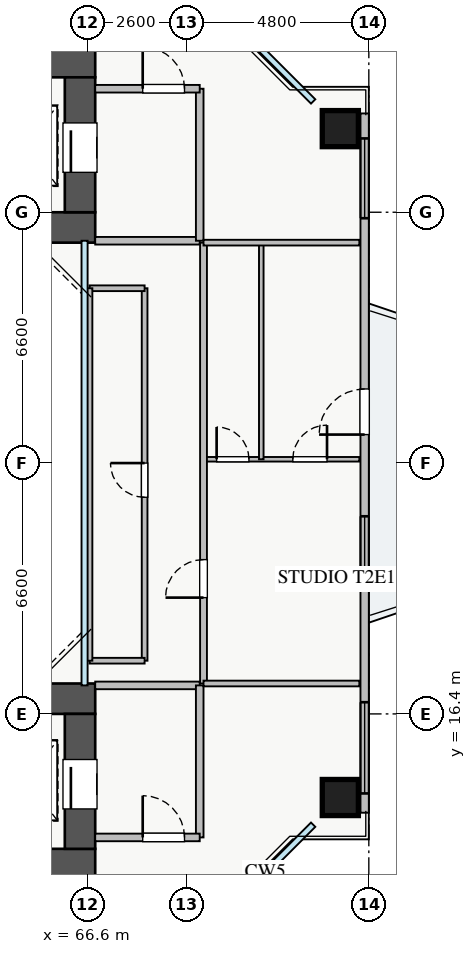
"""IFC4 building model, lengths in metres.
Left out: names, types, materials, properties, quantities, classifications, styles, units other than length and angle.
Written with IfcOpenShell. Run it as: python <this file> out.ifc"""

import sys

from ifc_helpers import new_model, si_unit, direction, frame, frame_2d, origin, origin_2d, place, context, subcontext, project, spatial, rectangle, extrude, source, transform, mapped, element, fill, save


model = new_model("IFC4")
c1 = context("Model", 3, precision=1e-05, world=origin(), true_north=direction((0.0, 1.0)))
c2 = subcontext(c1, "Body", "Model", "MODEL_VIEW")
j1 = project(units=[si_unit("LENGTHUNIT", "METRE"), si_unit("PLANEANGLEUNIT", "RADIAN")], contexts=[c1])
p1 = place(None, origin())
s1 = spatial("IfcSite", under=j1, at=p1, CompositionType="ELEMENT")
p2 = place(p1, origin())
s2 = spatial("IfcBuilding", under=s1, at=p2, CompositionType="ELEMENT")
p3 = place(p2, frame((0.0, 0.0, 63.25)))
s3 = spatial("IfcBuildingStorey", under=s2, at=p3, CompositionType="ELEMENT", Elevation=63.25)
p4 = place(p3, frame((54.2, 29.2, 0.0), z_axis=(0.0, 0.0, 1.0), x_axis=(1.0, 0.0, 0.0)))
e1 = element("IfcWall", 1, at=p4, inside=s3, PredefinedType="SHEAR", context=c2, shape_type="SweptSolid", body=[
    extrude(rectangle(XDim=12.6, YDim=0.8, at=frame_2d((6.3, 0.0))), origin(), (0.0, 0.0, 1.0), 3.25),
])
p5 = place(p3, frame((54.2, 33.55, 0.0), z_axis=(0.0, 0.0, 1.0), x_axis=(1.0, 0.0, 0.0)))
e2 = element("IfcWall", 2, at=p5, inside=s3, PredefinedType="SHEAR", context=c2, shape_type="SweptSolid", body=[
    extrude(rectangle(XDim=12.6, YDim=0.8, at=frame_2d((6.3, 0.0))), origin(), (0.0, 0.0, 1.0), 3.25),
])
p6 = place(p5, frame((8.2, 0.0, 0.0)))
e3 = element("IfcOpeningElement", 3, at=p6, cuts=e2, PredefinedType="OPENING", context=c2, shape_type="SweptSolid", body=[
    extrude(rectangle(XDim=1.1, YDim=2.05, at=frame_2d((0.55, 1.025))), frame((0.0, 0.41, 0.0), z_axis=(0.0, -1.0, 0.0), x_axis=(1.0, 0.0, 0.0)), (0.0, 0.0, 1.0), 0.82),
])
p7 = place(p3, frame((66.4, 29.6, 0.0), z_axis=(0.0, 0.0, 1.0), x_axis=(0.0, 1.0, 0.0)))
e4 = element("IfcWall", 4, at=p7, inside=s3, PredefinedType="SHEAR", context=c2, shape_type="SweptSolid", body=[
    extrude(rectangle(XDim=3.55, YDim=0.8, at=frame_2d((1.775, 0.0))), origin(), (0.0, 0.0, 1.0), 3.25),
])
p8 = place(p7, frame((1.05, 0.0, 0.0)))
e5 = element("IfcOpeningElement", 5, at=p8, cuts=e4, PredefinedType="OPENING", context=c2, shape_type="SweptSolid", body=[
    extrude(rectangle(XDim=1.3, YDim=2.05, at=frame_2d((0.65, 1.025))), frame((0.0, 0.41, 0.0), z_axis=(0.0, -1.0, 0.0), x_axis=(1.0, 0.0, 0.0)), (0.0, 0.0, 1.0), 0.82),
])
p9 = place(p3, frame((54.2, 12.45, 0.0), z_axis=(0.0, 0.0, 1.0), x_axis=(1.0, 0.0, 0.0)))
e6 = element("IfcWall", 6, at=p9, inside=s3, PredefinedType="SHEAR", context=c2, shape_type="SweptSolid", body=[
    extrude(rectangle(XDim=12.6, YDim=0.8, at=frame_2d((6.3, 0.0))), origin(), (0.0, 0.0, 1.0), 3.25),
])
p10 = place(p9, frame((8.2, 0.0, 0.0)))
e7 = element("IfcOpeningElement", 7, at=p10, cuts=e6, PredefinedType="OPENING", context=c2, shape_type="SweptSolid", body=[
    extrude(rectangle(XDim=1.1, YDim=2.05, at=frame_2d((0.55, 1.025))), frame((0.0, 0.41, 0.0), z_axis=(0.0, -1.0, 0.0), x_axis=(1.0, 0.0, 0.0)), (0.0, 0.0, 1.0), 0.82),
])
p11 = place(p3, frame((54.2, 16.8, 0.0), z_axis=(0.0, 0.0, 1.0), x_axis=(1.0, 0.0, 0.0)))
e8 = element("IfcWall", 8, at=p11, inside=s3, PredefinedType="SHEAR", context=c2, shape_type="SweptSolid", body=[
    extrude(rectangle(XDim=12.6, YDim=0.8, at=frame_2d((6.3, 0.0))), origin(), (0.0, 0.0, 1.0), 3.25),
])
p12 = place(p3, frame((66.4, 12.85, 0.0), z_axis=(0.0, 0.0, 1.0), x_axis=(0.0, 1.0, 0.0)))
e9 = element("IfcWall", 9, at=p12, inside=s3, PredefinedType="SHEAR", context=c2, shape_type="SweptSolid", body=[
    extrude(rectangle(XDim=3.55, YDim=0.8, at=frame_2d((1.775, 0.0))), origin(), (0.0, 0.0, 1.0), 3.25),
])
p13 = place(p12, frame((1.05, 0.0, 0.0)))
e10 = element("IfcOpeningElement", 10, at=p13, cuts=e9, PredefinedType="OPENING", context=c2, shape_type="SweptSolid", body=[
    extrude(rectangle(XDim=1.3, YDim=2.05, at=frame_2d((0.65, 1.025))), frame((0.0, 0.41, 0.0), z_axis=(0.0, -1.0, 0.0), x_axis=(1.0, 0.0, 0.0)), (0.0, 0.0, 1.0), 0.82),
])
m1 = source(origin(), c2, "Body", "SweptSolid", [
    extrude(rectangle(XDim=0.95, YDim=0.95, at=origin_2d()), origin(), (0.0, 0.0, 1.0), 3.25),
])
for number, where, z_axis, x_axis in (
    (11, (73.25, 14.2, 0.0), (0.0, 0.0, 1.0), (1.0, 0.0, 0.0)),
    (12, (73.25, 31.8, 0.0), (0.0, 0.0, 1.0), (1.0, 0.0, 0.0)),
):
    element("IfcColumn", number, at=place(p3, frame(where, z_axis=z_axis, x_axis=x_axis)), inside=s3, PredefinedType="COLUMN", context=c2, shape_type="MappedRepresentation", body=[
        mapped(m1, transform((0.0, 0.0, 0.0), x_axis=(1.0, 0.0, 0.0), y_axis=(0.0, 1.0, 0.0), z_axis=(0.0, 0.0, 1.0), scale=1.0)),
    ])
p14 = place(p3, frame((73.89, 13.8, 0.0), z_axis=(0.0, 0.0, 1.0), x_axis=(0.0, 1.0, 0.0)))
e13 = element("IfcWall", 13, at=p14, inside=s3, PredefinedType="STANDARD", context=c2, shape_type="SweptSolid", body=[
    extrude(rectangle(XDim=18.4, YDim=0.22, at=frame_2d((9.2, 0.0))), origin(), (0.0, 0.0, 1.0), 2.61),
])
p15 = place(p14, frame((9.95, 0.0, 0.0)))
e14 = element("IfcOpeningElement", 14, at=p15, cuts=e13, PredefinedType="OPENING", context=c2, shape_type="SweptSolid", body=[
    extrude(rectangle(XDim=1.2, YDim=2.1, at=frame_2d((0.6, 1.05))), frame((0.0, 0.12, 0.0), z_axis=(0.0, -1.0, 0.0), x_axis=(1.0, 0.0, 0.0)), (0.0, 0.0, 1.0), 0.24),
])
p16 = place(p14, frame((0.508, 0.0, 0.9)))
e15 = element("IfcOpeningElement", 15, at=p16, cuts=e13, PredefinedType="OPENING", context=c2, shape_type="SweptSolid", body=[
    extrude(rectangle(XDim=2.4, YDim=1.5, at=frame_2d((1.2, 0.75))), frame((0.0, 0.12, 0.0), z_axis=(0.0, -1.0, 0.0), x_axis=(1.0, 0.0, 0.0)), (0.0, 0.0, 1.0), 0.24),
])
p17 = place(p14, frame((6.0, 0.0, 0.9)))
e16 = element("IfcOpeningElement", 16, at=p17, cuts=e13, PredefinedType="OPENING", context=c2, shape_type="SweptSolid", body=[
    extrude(rectangle(XDim=1.8, YDim=1.45, at=frame_2d((0.9, 0.725))), frame((0.0, 0.12, 0.0), z_axis=(0.0, -1.0, 0.0), x_axis=(1.0, 0.0, 0.0)), (0.0, 0.0, 1.0), 0.24),
])
p18 = place(p14, frame((15.643, 0.0, 0.9)))
e17 = element("IfcOpeningElement", 17, at=p18, cuts=e13, PredefinedType="OPENING", context=c2, shape_type="SweptSolid", body=[
    extrude(rectangle(XDim=2.1, YDim=1.5, at=frame_2d((1.05, 0.75))), frame((0.0, 0.12, 0.0), z_axis=(0.0, -1.0, 0.0), x_axis=(1.0, 0.0, 0.0)), (0.0, 0.0, 1.0), 0.24),
])
p19 = place(p3, frame((66.8, 28.85, 0.0), z_axis=(0.0, 0.0, 1.0), x_axis=(1.0, 0.0, 0.0)))
e18 = element("IfcWall", 18, at=p19, inside=s3, PredefinedType="PARTITIONING", context=c2, shape_type="SweptSolid", body=[
    extrude(rectangle(XDim=2.75, YDim=0.2, at=frame_2d((1.375, 0.0))), origin(), (0.0, 0.0, 1.0), 3.07),
])
p20 = place(p3, frame((69.55, 28.85, 0.0), z_axis=(0.0, 0.0, 1.0), x_axis=(0.0, 1.0, 0.0)))
e19 = element("IfcWall", 19, at=p20, inside=s3, PredefinedType="PARTITIONING", context=c2, shape_type="SweptSolid", body=[
    extrude(rectangle(XDim=4.0, YDim=0.2, at=frame_2d((2.0, 0.0))), origin(), (0.0, 0.0, 1.0), 2.615),
])
p21 = place(p3, frame((66.8, 32.85, 0.0), z_axis=(0.0, 0.0, 1.0), x_axis=(1.0, 0.0, 0.0)))
e20 = element("IfcWall", 20, at=p21, inside=s3, PredefinedType="PARTITIONING", context=c2, shape_type="SweptSolid", body=[
    extrude(rectangle(XDim=2.75, YDim=0.2, at=frame_2d((1.375, 0.0))), origin(), (0.0, 0.0, 1.0), 3.07),
])
p22 = place(p21, frame((1.25, 0.0, 0.0)))
e21 = element("IfcOpeningElement", 21, at=p22, cuts=e20, PredefinedType="OPENING", context=c2, shape_type="SweptSolid", body=[
    extrude(rectangle(XDim=1.1, YDim=2.05, at=frame_2d((0.55, 1.025))), frame((0.0, 0.11, 0.0), z_axis=(0.0, -1.0, 0.0), x_axis=(1.0, 0.0, 0.0)), (0.0, 0.0, 1.0), 0.22),
])
p23 = place(p3, frame((66.8, 17.15, 0.0), z_axis=(0.0, 0.0, 1.0), x_axis=(1.0, 0.0, 0.0)))
e22 = element("IfcWall", 22, at=p23, inside=s3, PredefinedType="PARTITIONING", context=c2, shape_type="SweptSolid", body=[
    extrude(rectangle(XDim=2.75, YDim=0.2, at=frame_2d((1.375, 0.0))), origin(), (0.0, 0.0, 1.0), 3.07),
])
p24 = place(p3, frame((69.55, 13.15, 0.0), z_axis=(0.0, 0.0, 1.0), x_axis=(0.0, 1.0, 0.0)))
e23 = element("IfcWall", 23, at=p24, inside=s3, PredefinedType="PARTITIONING", context=c2, shape_type="SweptSolid", body=[
    extrude(rectangle(XDim=4.0, YDim=0.2, at=frame_2d((2.0, 0.0))), origin(), (0.0, 0.0, 1.0), 2.615),
])
p25 = place(p3, frame((66.8, 13.15, 0.0), z_axis=(0.0, 0.0, 1.0), x_axis=(1.0, 0.0, 0.0)))
e24 = element("IfcWall", 24, at=p25, inside=s3, PredefinedType="PARTITIONING", context=c2, shape_type="SweptSolid", body=[
    extrude(rectangle(XDim=2.75, YDim=0.2, at=frame_2d((1.375, 0.0))), origin(), (0.0, 0.0, 1.0), 3.07),
])
p26 = place(p25, frame((1.25, 0.0, 0.0)))
e25 = element("IfcOpeningElement", 25, at=p26, cuts=e24, PredefinedType="OPENING", context=c2, shape_type="SweptSolid", body=[
    extrude(rectangle(XDim=1.1, YDim=2.05, at=frame_2d((0.55, 1.025))), frame((0.0, 0.11, 0.0), z_axis=(0.0, -1.0, 0.0), x_axis=(1.0, 0.0, 0.0)), (0.0, 0.0, 1.0), 0.22),
])
p27 = place(p3, frame((69.65, 23.1, 0.0), z_axis=(0.0, 0.0, 1.0), x_axis=(1.0, 0.0, 0.0)))
e26 = element("IfcWall", 26, at=p27, inside=s3, PredefinedType="PLUMBINGWALL", context=c2, shape_type="SweptSolid", body=[
    extrude(rectangle(XDim=4.1, YDim=0.12, at=frame_2d((2.05, 0.0))), origin(), (0.0, 0.0, 1.0), 2.771),
])
p28 = place(p27, frame((0.345, 0.0, 0.0)))
e27 = element("IfcOpeningElement", 27, at=p28, cuts=e26, PredefinedType="OPENING", context=c2, shape_type="SweptSolid", body=[
    extrude(rectangle(XDim=0.85, YDim=2.05, at=frame_2d((0.425, 1.025))), frame((0.0, 0.07, 0.0), z_axis=(0.0, -1.0, 0.0), x_axis=(1.0, 0.0, 0.0)), (0.0, 0.0, 1.0), 0.14),
])
p29 = place(p27, frame((2.35, 0.0, 0.0)))
e28 = element("IfcOpeningElement", 28, at=p29, cuts=e26, PredefinedType="OPENING", context=c2, shape_type="SweptSolid", body=[
    extrude(rectangle(XDim=0.9, YDim=2.05, at=frame_2d((0.45, 1.025))), frame((0.0, 0.07, 0.0), z_axis=(0.0, -1.0, 0.0), x_axis=(1.0, 0.0, 0.0)), (0.0, 0.0, 1.0), 0.14),
])
p30 = place(p3, frame((71.17, 23.1, 0.0), z_axis=(0.0, 0.0, 1.0), x_axis=(0.0, 1.0, 0.0)))
e29 = element("IfcWall", 29, at=p30, inside=s3, PredefinedType="PLUMBINGWALL", context=c2, shape_type="SweptSolid", body=[
    extrude(rectangle(XDim=5.7, YDim=0.12, at=frame_2d((2.85, 0.0))), origin(), (0.0, 0.0, 1.0), 3.07),
])
p31 = place(p3, frame((69.65, 17.2, 0.0), z_axis=(0.0, 0.0, 1.0), x_axis=(0.0, 1.0, 0.0)))
e30 = element("IfcWall", 30, at=p31, inside=s3, PredefinedType="PARTITIONING", context=c2, shape_type="SweptSolid", body=[
    extrude(rectangle(XDim=11.6, YDim=0.18, at=frame_2d((5.8, 0.0))), origin(), (0.0, 0.0, 1.0), 3.07),
])
p32 = place(p31, frame((2.26, 0.0, 0.0)))
e31 = element("IfcOpeningElement", 31, at=p32, cuts=e30, PredefinedType="OPENING", context=c2, shape_type="SweptSolid", body=[
    extrude(rectangle(XDim=1.0, YDim=2.05, at=frame_2d((0.5, 1.025))), frame((0.0, 0.1, 0.0), z_axis=(0.0, -1.0, 0.0), x_axis=(1.0, 0.0, 0.0)), (0.0, 0.0, 1.0), 0.2),
])
for number, where, z_axis, x_axis in (
    (32, (69.65, 17.2, 0.0), (0.0, 0.0, 1.0), (1.0, 0.0, 0.0)),
    (33, (69.65, 28.8, 0.0), (0.0, 0.0, 1.0), (1.0, 0.0, 0.0)),
):
    element("IfcWall", number, at=place(p3, frame(where, z_axis=z_axis, x_axis=x_axis)), inside=s3, PredefinedType="PARTITIONING", context=c2, shape_type="SweptSolid", body=[
        extrude(rectangle(XDim=4.1, YDim=0.15, at=frame_2d((2.05, 0.0))), origin(), (0.0, 0.0, 1.0), 3.07),
    ])
p33 = place(p3, frame((68.1, 17.8, 0.0), z_axis=(0.0, 0.0, 1.0), x_axis=(0.0, 1.0, 0.0)))
e34 = element("IfcWall", 34, at=p33, inside=s3, PredefinedType="PARTITIONING", context=c2, shape_type="SweptSolid", body=[
    extrude(rectangle(XDim=9.8, YDim=0.15, at=frame_2d((4.9, 0.0))), origin(), (0.0, 0.0, 1.0), 3.07),
])
p34 = place(p33, frame((4.3, 0.0, 0.0)))
e35 = element("IfcOpeningElement", 35, at=p34, cuts=e34, PredefinedType="OPENING", context=c2, shape_type="SweptSolid", body=[
    extrude(rectangle(XDim=0.9, YDim=2.05, at=frame_2d((0.45, 1.025))), frame((0.0, 0.085, 0.0), z_axis=(0.0, -1.0, 0.0), x_axis=(1.0, 0.0, 0.0)), (0.0, 0.0, 1.0), 0.17),
])
p35 = place(p3, frame((66.65, 27.6, 0.0), z_axis=(0.0, 0.0, 1.0), x_axis=(1.0, 0.0, 0.0)))
e36 = element("IfcWall", 36, at=p35, inside=s3, PredefinedType="PARTITIONING", context=c2, shape_type="SweptSolid", body=[
    extrude(rectangle(XDim=1.45, YDim=0.15, at=frame_2d((0.725, 0.0))), origin(), (0.0, 0.0, 1.0), 2.771),
])
p36 = place(p3, frame((66.65, 17.8, 0.0), z_axis=(0.0, 0.0, 1.0), x_axis=(1.0, 0.0, 0.0)))
e37 = element("IfcWall", 37, at=p36, inside=s3, PredefinedType="PARTITIONING", context=c2, shape_type="SweptSolid", body=[
    extrude(rectangle(XDim=1.45, YDim=0.15, at=frame_2d((0.725, 0.0))), origin(), (0.0, 0.0, 1.0), 3.07),
])
p37 = place(p3, frame((66.65, 17.8, 0.0), z_axis=(0.0, 0.0, 1.0), x_axis=(0.0, 1.0, 0.0)))
e38 = element("IfcWall", 38, at=p37, inside=s3, PredefinedType="PARTITIONING", context=c2, shape_type="SweptSolid", body=[
    extrude(rectangle(XDim=9.8, YDim=0.15, at=frame_2d((4.9, 0.0))), origin(), (0.0, 0.0, 1.0), 2.665),
])
m2 = source(origin(), c2, "Body", "SweptSolid", [
    extrude(rectangle(XDim=1.2, YDim=2.1, at=frame_2d((0.6, 1.05))), frame((0.0, 0.025, 0.0), z_axis=(0.0, -1.0, 0.0), x_axis=(1.0, 0.0, 0.0)), (0.0, 0.0, 1.0), 0.05),
])
p38 = place(p15, origin())
e39 = element("IfcDoor", 39, at=p38, inside=s3, OperationType="SINGLE_SWING_LEFT", PredefinedType="DOOR", context=c2, shape_type="MappedRepresentation", body=[
    mapped(m2, transform((0.0, 0.0, 0.0), x_axis=(1.0, 0.0, 0.0), y_axis=(0.0, 1.0, 0.0), z_axis=(0.0, 0.0, 1.0), scale=1.0)),
])
fill(e14, e39)
m3 = source(origin(), c2, "Body", "SweptSolid", [
    extrude(rectangle(XDim=2.4, YDim=1.5, at=frame_2d((1.2, 0.75))), frame((0.0, 0.03, 0.0), z_axis=(0.0, -1.0, 0.0), x_axis=(1.0, 0.0, 0.0)), (0.0, 0.0, 1.0), 0.06),
])
p39 = place(p16, origin())
e40 = element("IfcWindow", 40, at=p39, inside=s3, PartitioningType="TRIPLE_PANEL_VERTICAL", PredefinedType="WINDOW", context=c2, shape_type="MappedRepresentation", body=[
    mapped(m3, transform((0.0, 0.0, 0.0), x_axis=(1.0, 0.0, 0.0), y_axis=(0.0, 1.0, 0.0), z_axis=(0.0, 0.0, 1.0), scale=1.0)),
])
fill(e15, e40)
m4 = source(origin(), c2, "Body", "SweptSolid", [
    extrude(rectangle(XDim=1.8, YDim=1.45, at=frame_2d((0.9, 0.725))), frame((0.0, 0.03, 0.0), z_axis=(0.0, -1.0, 0.0), x_axis=(1.0, 0.0, 0.0)), (0.0, 0.0, 1.0), 0.06),
])
p40 = place(p17, origin())
e41 = element("IfcWindow", 41, at=p40, inside=s3, PartitioningType="DOUBLE_PANEL_VERTICAL", PredefinedType="WINDOW", context=c2, shape_type="MappedRepresentation", body=[
    mapped(m4, transform((0.0, 0.0, 0.0), x_axis=(1.0, 0.0, 0.0), y_axis=(0.0, 1.0, 0.0), z_axis=(0.0, 0.0, 1.0), scale=1.0)),
])
fill(e16, e41)
m5 = source(origin(), c2, "Body", "SweptSolid", [
    extrude(rectangle(XDim=2.1, YDim=1.5, at=frame_2d((1.05, 0.75))), frame((0.0, 0.03, 0.0), z_axis=(0.0, -1.0, 0.0), x_axis=(1.0, 0.0, 0.0)), (0.0, 0.0, 1.0), 0.06),
])
p41 = place(p18, origin())
e42 = element("IfcWindow", 42, at=p41, inside=s3, PartitioningType="TRIPLE_PANEL_VERTICAL", PredefinedType="WINDOW", context=c2, shape_type="MappedRepresentation", body=[
    mapped(m5, transform((0.0, 0.0, 0.0), x_axis=(1.0, 0.0, 0.0), y_axis=(0.0, 1.0, 0.0), z_axis=(0.0, 0.0, 1.0), scale=1.0)),
])
fill(e17, e42)
m6 = source(origin(), c2, "Body", "SweptSolid", [
    extrude(rectangle(XDim=1.3, YDim=2.05, at=frame_2d((0.65, 1.025))), frame((0.0, 0.025, 0.0), z_axis=(0.0, -1.0, 0.0), x_axis=(1.0, 0.0, 0.0)), (0.0, 0.0, 1.0), 0.05),
])
p42 = place(p8, origin())
e43 = element("IfcDoor", 43, at=p42, inside=s3, OperationType="SLIDING_TO_LEFT", PredefinedType="DOOR", context=c2, shape_type="MappedRepresentation", body=[
    mapped(m6, transform((0.0, 0.0, 0.0), x_axis=(1.0, 0.0, 0.0), y_axis=(0.0, 1.0, 0.0), z_axis=(0.0, 0.0, 1.0), scale=1.0)),
])
fill(e5, e43)
p43 = place(p13, origin())
e44 = element("IfcDoor", 44, at=p43, inside=s3, OperationType="SLIDING_TO_RIGHT", PredefinedType="DOOR", context=c2, shape_type="MappedRepresentation", body=[
    mapped(m6, transform((0.0, 0.0, 0.0), x_axis=(1.0, 0.0, 0.0), y_axis=(0.0, 1.0, 0.0), z_axis=(0.0, 0.0, 1.0), scale=1.0)),
])
fill(e10, e44)
m7 = source(origin(), c2, "Body", "SweptSolid", [
    extrude(rectangle(XDim=1.1, YDim=2.05, at=frame_2d((0.55, 1.025))), frame((0.0, 0.025, 0.0), z_axis=(0.0, -1.0, 0.0), x_axis=(1.0, 0.0, 0.0)), (0.0, 0.0, 1.0), 0.05),
])
p44 = place(p22, origin())
e45 = element("IfcDoor", 45, at=p44, inside=s3, OperationType="SINGLE_SWING_LEFT", PredefinedType="DOOR", context=c2, shape_type="MappedRepresentation", body=[
    mapped(m7, transform((0.0, 0.0, 0.0), x_axis=(1.0, 0.0, 0.0), y_axis=(0.0, 1.0, 0.0), z_axis=(0.0, 0.0, 1.0), scale=1.0)),
])
fill(e21, e45)
p45 = place(p26, origin())
e46 = element("IfcDoor", 46, at=p45, inside=s3, OperationType="SINGLE_SWING_LEFT", PredefinedType="DOOR", context=c2, shape_type="MappedRepresentation", body=[
    mapped(m7, transform((0.0, 0.0, 0.0), x_axis=(1.0, 0.0, 0.0), y_axis=(0.0, 1.0, 0.0), z_axis=(0.0, 0.0, 1.0), scale=1.0)),
])
fill(e25, e46)
m8 = source(origin(), c2, "Body", "SweptSolid", [
    extrude(rectangle(XDim=0.85, YDim=2.05, at=frame_2d((0.425, 1.025))), frame((0.0, 0.025, 0.0), z_axis=(0.0, -1.0, 0.0), x_axis=(1.0, 0.0, 0.0)), (0.0, 0.0, 1.0), 0.05),
])
p46 = place(p28, origin())
e47 = element("IfcDoor", 47, at=p46, inside=s3, OperationType="SINGLE_SWING_LEFT", PredefinedType="DOOR", context=c2, shape_type="MappedRepresentation", body=[
    mapped(m8, transform((0.0, 0.0, 0.0), x_axis=(1.0, 0.0, 0.0), y_axis=(0.0, 1.0, 0.0), z_axis=(0.0, 0.0, 1.0), scale=1.0)),
])
fill(e27, e47)
m9 = source(origin(), c2, "Body", "SweptSolid", [
    extrude(rectangle(XDim=0.9, YDim=2.05, at=frame_2d((0.45, 1.025))), frame((0.0, 0.025, 0.0), z_axis=(0.0, -1.0, 0.0), x_axis=(1.0, 0.0, 0.0)), (0.0, 0.0, 1.0), 0.05),
])
p47 = place(p29, origin())
e48 = element("IfcDoor", 48, at=p47, inside=s3, OperationType="SINGLE_SWING_RIGHT", PredefinedType="DOOR", context=c2, shape_type="MappedRepresentation", body=[
    mapped(m9, transform((0.0, 0.0, 0.0), x_axis=(1.0, 0.0, 0.0), y_axis=(0.0, 1.0, 0.0), z_axis=(0.0, 0.0, 1.0), scale=1.0)),
])
fill(e28, e48)
m10 = source(origin(), c2, "Body", "SweptSolid", [
    extrude(rectangle(XDim=1.0, YDim=2.05, at=frame_2d((0.5, 1.025))), frame((0.0, 0.025, 0.0), z_axis=(0.0, -1.0, 0.0), x_axis=(1.0, 0.0, 0.0)), (0.0, 0.0, 1.0), 0.05),
])
p48 = place(p32, origin())
e49 = element("IfcDoor", 49, at=p48, inside=s3, OperationType="SINGLE_SWING_LEFT", PredefinedType="DOOR", context=c2, shape_type="MappedRepresentation", body=[
    mapped(m10, transform((0.0, 0.0, 0.0), x_axis=(1.0, 0.0, 0.0), y_axis=(0.0, 1.0, 0.0), z_axis=(0.0, 0.0, 1.0), scale=1.0)),
])
fill(e31, e49)
p49 = place(p34, origin())
e50 = element("IfcDoor", 50, at=p49, inside=s3, OperationType="SINGLE_SWING_RIGHT", PredefinedType="DOOR", context=c2, shape_type="MappedRepresentation", body=[
    mapped(m9, transform((0.0, 0.0, 0.0), x_axis=(1.0, 0.0, 0.0), y_axis=(0.0, 1.0, 0.0), z_axis=(0.0, 0.0, 1.0), scale=1.0)),
])
fill(e35, e50)
save(model, sys.argv[1])
